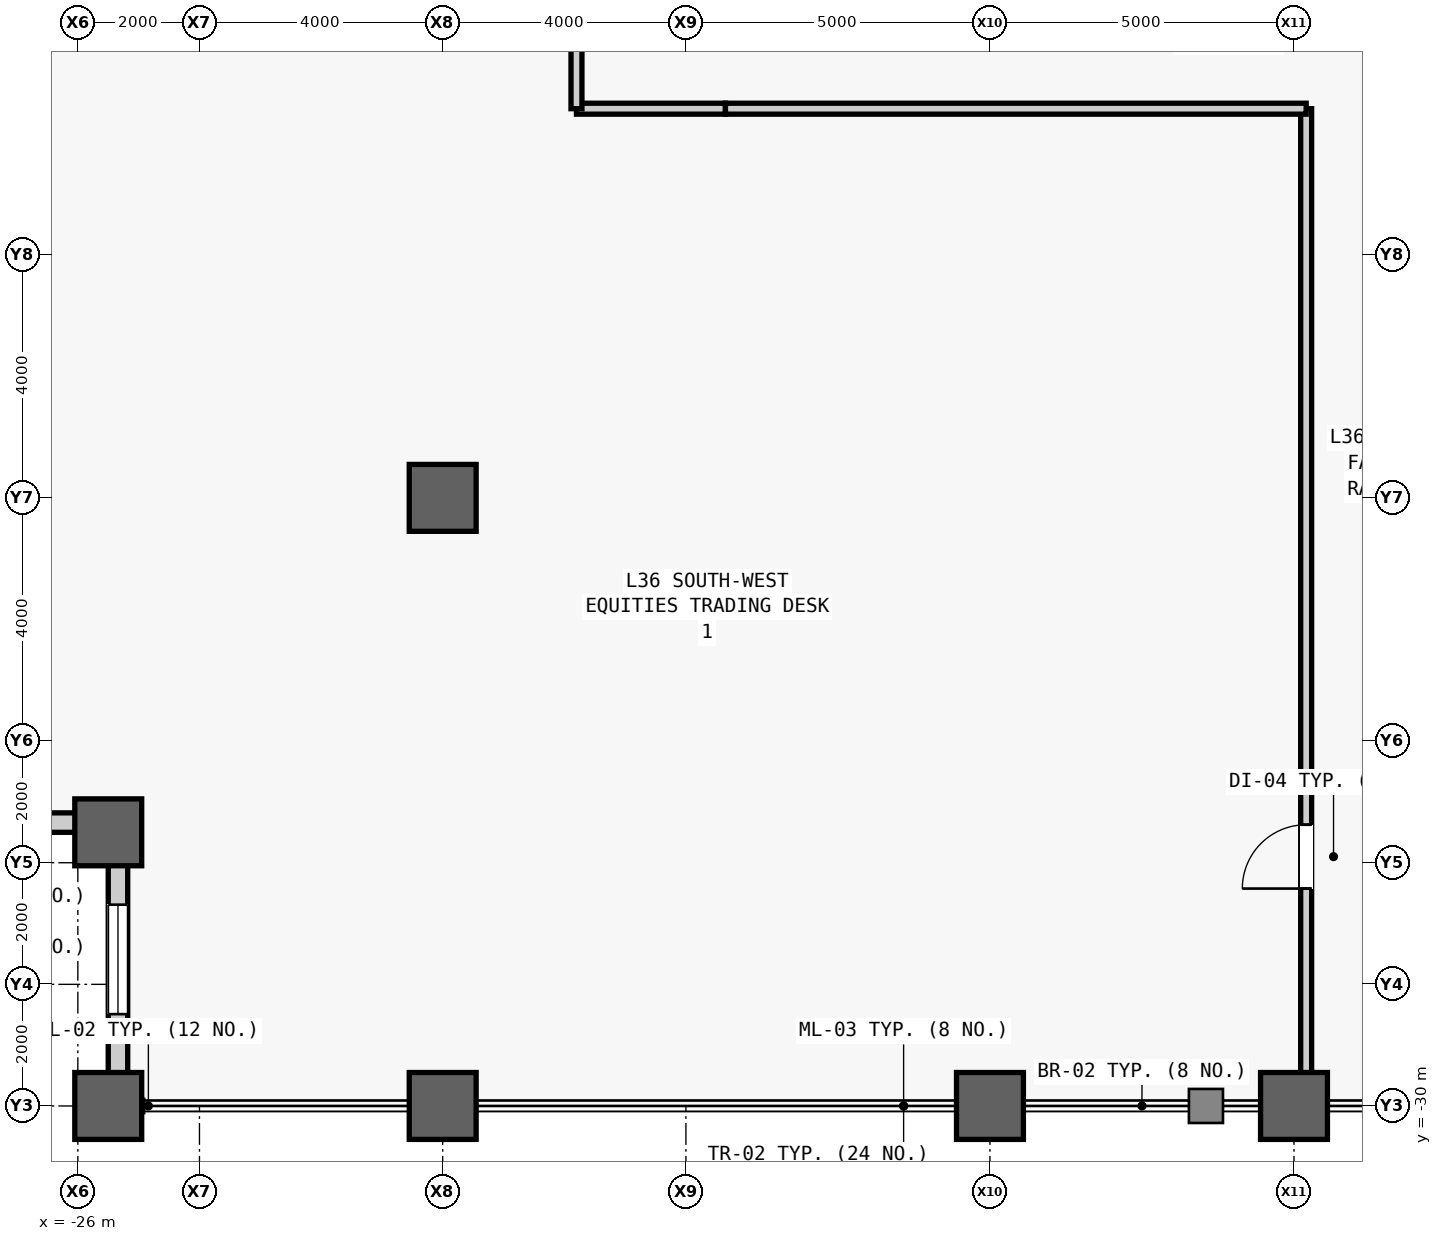
"""IFC4 building model, lengths in metres.
Left out: names, types, materials, properties, quantities, classifications, styles, units other than length and angle.
Written with IfcOpenShell. Run it as: python <this file> out.ifc"""

import sys

from ifc_helpers import new_model, si_unit, direction, frame, frame_2d, origin, origin_2d, place, context, subcontext, project, spatial, rectangle, hollow_rectangle, extrude, source, transform, mapped, element, fill, save


model = new_model("IFC4")
c1 = context("Model", 3, precision=1e-05, world=origin(), true_north=direction((0.0, 1.0)))
c2 = subcontext(c1, "Body", "Model", "MODEL_VIEW")
j1 = project(units=[si_unit("LENGTHUNIT", "METRE"), si_unit("PLANEANGLEUNIT", "RADIAN")], contexts=[c1])
p1 = place(None, origin())
s1 = spatial("IfcSite", under=j1, at=p1, CompositionType="ELEMENT")
p2 = place(p1, origin())
s2 = spatial("IfcBuilding", under=s1, at=p2, CompositionType="ELEMENT")
p3 = place(p2, frame((0.0, 0.0, 159.1)))
s3 = spatial("IfcBuildingStorey", under=s2, at=p3, CompositionType="ELEMENT", Elevation=159.1)
m1 = source(origin(), c2, "Body", "SweptSolid", [
    extrude(hollow_rectangle(XDim=1.1, YDim=1.1, WallThickness=0.06, at=origin_2d()), origin(), (0.0, 0.0, 1.0), 4.0),
])
for number, where, z_axis, x_axis in (
    (1, (-25.5, -30.0, 0.0), (0.0, 0.0, 1.0), (1.0, 0.0, 0.0)),
    (2, (-25.5, -25.5, 0.0), (0.0, 0.0, 1.0), (1.0, 0.0, 0.0)),
    (3, (-20.0, -30.0, 0.0), (0.0, 0.0, 1.0), (1.0, 0.0, 0.0)),
    (4, (-20.0, -20.0, 0.0), (0.0, 0.0, 1.0), (1.0, 0.0, 0.0)),
    (5, (-11.0, -30.0, 0.0), (0.0, 0.0, 1.0), (1.0, 0.0, 0.0)),
    (6, (-6.0, -30.0, 0.0), (0.0, 0.0, 1.0), (1.0, 0.0, 0.0)),
):
    element("IfcColumn", number, at=place(p3, frame(where, z_axis=z_axis, x_axis=x_axis)), inside=s3, PredefinedType="COLUMN", context=c2, shape_type="MappedRepresentation", body=[
        mapped(m1, transform((0.0, 0.0, 0.0), scale=1.0)),
    ])
m2 = source(origin(), c2, "Body", "SweptSolid", [
    extrude(rectangle(XDim=4.18, YDim=0.32, at=frame_2d((2.09, 0.0))), origin(), (0.0, 0.0, 1.0), 3.164),
])
p4 = place(p3, frame((-25.5, -25.34, 0.0), z_axis=(0.0, 0.0, 1.0), x_axis=(-1.0, 0.0, 0.0)))
e7 = element("IfcWall", 7, at=p4, inside=s3, PredefinedType="STANDARD", context=c2, shape_type="MappedRepresentation", body=[
    mapped(m2, transform((0.0, 0.0, 0.0), scale=1.0)),
])
m3 = source(origin(), c2, "Body", "SweptSolid", [
    extrude(rectangle(XDim=1.8, YDim=2.4, at=frame_2d((0.9, 1.2))), frame((0.0, 0.17, 0.0), z_axis=(0.0, -1.0, 0.0), x_axis=(1.0, 0.0, 0.0)), (0.0, 0.0, 1.0), 0.34),
])
p5 = place(p4, frame((1.19, 0.0, 0.5)))
e8 = element("IfcOpeningElement", 8, at=p5, cuts=e7, PredefinedType="OPENING", context=c2, shape_type="MappedRepresentation", body=[
    mapped(m3, transform((0.0, 0.0, 0.0), scale=1.0)),
])
p6 = place(p3, frame((-25.34, -29.68, 0.0), z_axis=(0.0, 0.0, 1.0), x_axis=(0.0, 1.0, 0.0)))
e9 = element("IfcWall", 9, at=p6, inside=s3, PredefinedType="STANDARD", context=c2, shape_type="MappedRepresentation", body=[
    mapped(m2, transform((0.0, 0.0, 0.0), scale=1.0)),
])
p7 = place(p6, frame((1.19, 0.0, 0.5)))
e10 = element("IfcOpeningElement", 10, at=p7, cuts=e9, PredefinedType="OPENING", context=c2, shape_type="MappedRepresentation", body=[
    mapped(m3, transform((0.0, 0.0, 0.0), scale=1.0)),
])
m4 = source(origin(), c2, "Body", "SweptSolid", [
    extrude(rectangle(XDim=2.45, YDim=0.18, at=frame_2d((1.225, 0.0))), origin(), (0.0, 0.0, 1.0), 3.78),
])
p8 = place(p3, frame((-17.8, -13.6, 0.0), z_axis=(0.0, 0.0, 1.0), x_axis=(1.0, 0.0, 0.0)))
e11 = element("IfcWall", 11, at=p8, inside=s3, PredefinedType="PARTITIONING", context=c2, shape_type="MappedRepresentation", body=[
    mapped(m4, transform((0.0, 0.0, 0.0), scale=1.0)),
])
m5 = source(origin(), c2, "Body", "SweptSolid", [
    extrude(rectangle(XDim=16.4, YDim=0.18, at=frame_2d((8.2, 0.0))), origin(), (0.0, 0.0, 1.0), 3.007),
])
p9 = place(p3, frame((-5.8, -30.0, 0.0), z_axis=(0.0, 0.0, 1.0), x_axis=(0.0, 1.0, 0.0)))
e12 = element("IfcWall", 12, at=p9, inside=s3, PredefinedType="PARTITIONING", context=c2, shape_type="MappedRepresentation", body=[
    mapped(m5, transform((0.0, 0.0, 0.0), scale=1.0)),
])
m6 = source(origin(), c2, "Body", "SweptSolid", [
    extrude(rectangle(XDim=1.05, YDim=2.2, at=frame_2d((0.525, 1.1))), frame((0.0, 0.1, 0.0), z_axis=(0.0, -1.0, 0.0), x_axis=(1.0, 0.0, 0.0)), (0.0, 0.0, 1.0), 0.2),
])
p10 = place(p9, frame((3.575, 0.0, 0.0)))
e13 = element("IfcOpeningElement", 13, at=p10, cuts=e12, PredefinedType="OPENING", context=c2, shape_type="MappedRepresentation", body=[
    mapped(m6, transform((0.0, 0.0, 0.0), scale=1.0)),
])
m7 = source(origin(), c2, "Body", "SweptSolid", [
    extrude(rectangle(XDim=9.55, YDim=0.18, at=frame_2d((4.775, 0.0))), origin(), (0.0, 0.0, 1.0), 3.78),
])
p11 = place(p3, frame((-15.35, -13.6, 0.0), z_axis=(0.0, 0.0, 1.0), x_axis=(1.0, 0.0, 0.0)))
e14 = element("IfcWall", 14, at=p11, inside=s3, PredefinedType="PARTITIONING", context=c2, shape_type="MappedRepresentation", body=[
    mapped(m7, transform((0.0, 0.0, 0.0), scale=1.0)),
])
m8 = source(origin(), c2, "Body", "SweptSolid", [
    extrude(rectangle(XDim=7.4, YDim=0.18, at=frame_2d((3.7, 0.0))), origin(), (0.0, 0.0, 1.0), 3.78),
])
p12 = place(p3, frame((-17.8, -13.6, 0.0), z_axis=(0.0, 0.0, 1.0), x_axis=(0.0, 1.0, 0.0)))
e15 = element("IfcWall", 15, at=p12, inside=s3, PredefinedType="PARTITIONING", context=c2, shape_type="MappedRepresentation", body=[
    mapped(m8, transform((0.0, 0.0, 0.0), scale=1.0)),
])
m9 = source(origin(), c2, "Body", "SweptSolid", [
    extrude(rectangle(XDim=1.8, YDim=2.4, at=frame_2d((0.9, 1.2))), frame((0.0, 0.03, 0.0), z_axis=(0.0, -1.0, 0.0), x_axis=(1.0, 0.0, 0.0)), (0.0, 0.0, 1.0), 0.06),
])
p13 = place(p7, origin())
e16 = element("IfcWindow", 16, at=p13, inside=s3, PartitioningType="SINGLE_PANEL", PredefinedType="WINDOW", context=c2, shape_type="MappedRepresentation", body=[
    mapped(m9, transform((0.0, 0.0, 0.0), scale=1.0)),
])
fill(e10, e16)
m10 = source(origin(), c2, "Body", "SweptSolid", [
    extrude(rectangle(XDim=1.05, YDim=2.2, at=frame_2d((0.525, 1.1))), frame((0.0, 0.025, 0.0), z_axis=(0.0, -1.0, 0.0), x_axis=(1.0, 0.0, 0.0)), (0.0, 0.0, 1.0), 0.05),
])
p14 = place(p10, origin())
e17 = element("IfcDoor", 17, at=p14, inside=s3, OperationType="SINGLE_SWING_LEFT", PredefinedType="DOOR", context=c2, shape_type="MappedRepresentation", body=[
    mapped(m10, transform((0.0, 0.0, 0.0), scale=1.0)),
])
fill(e13, e17)
save(model, sys.argv[1])
